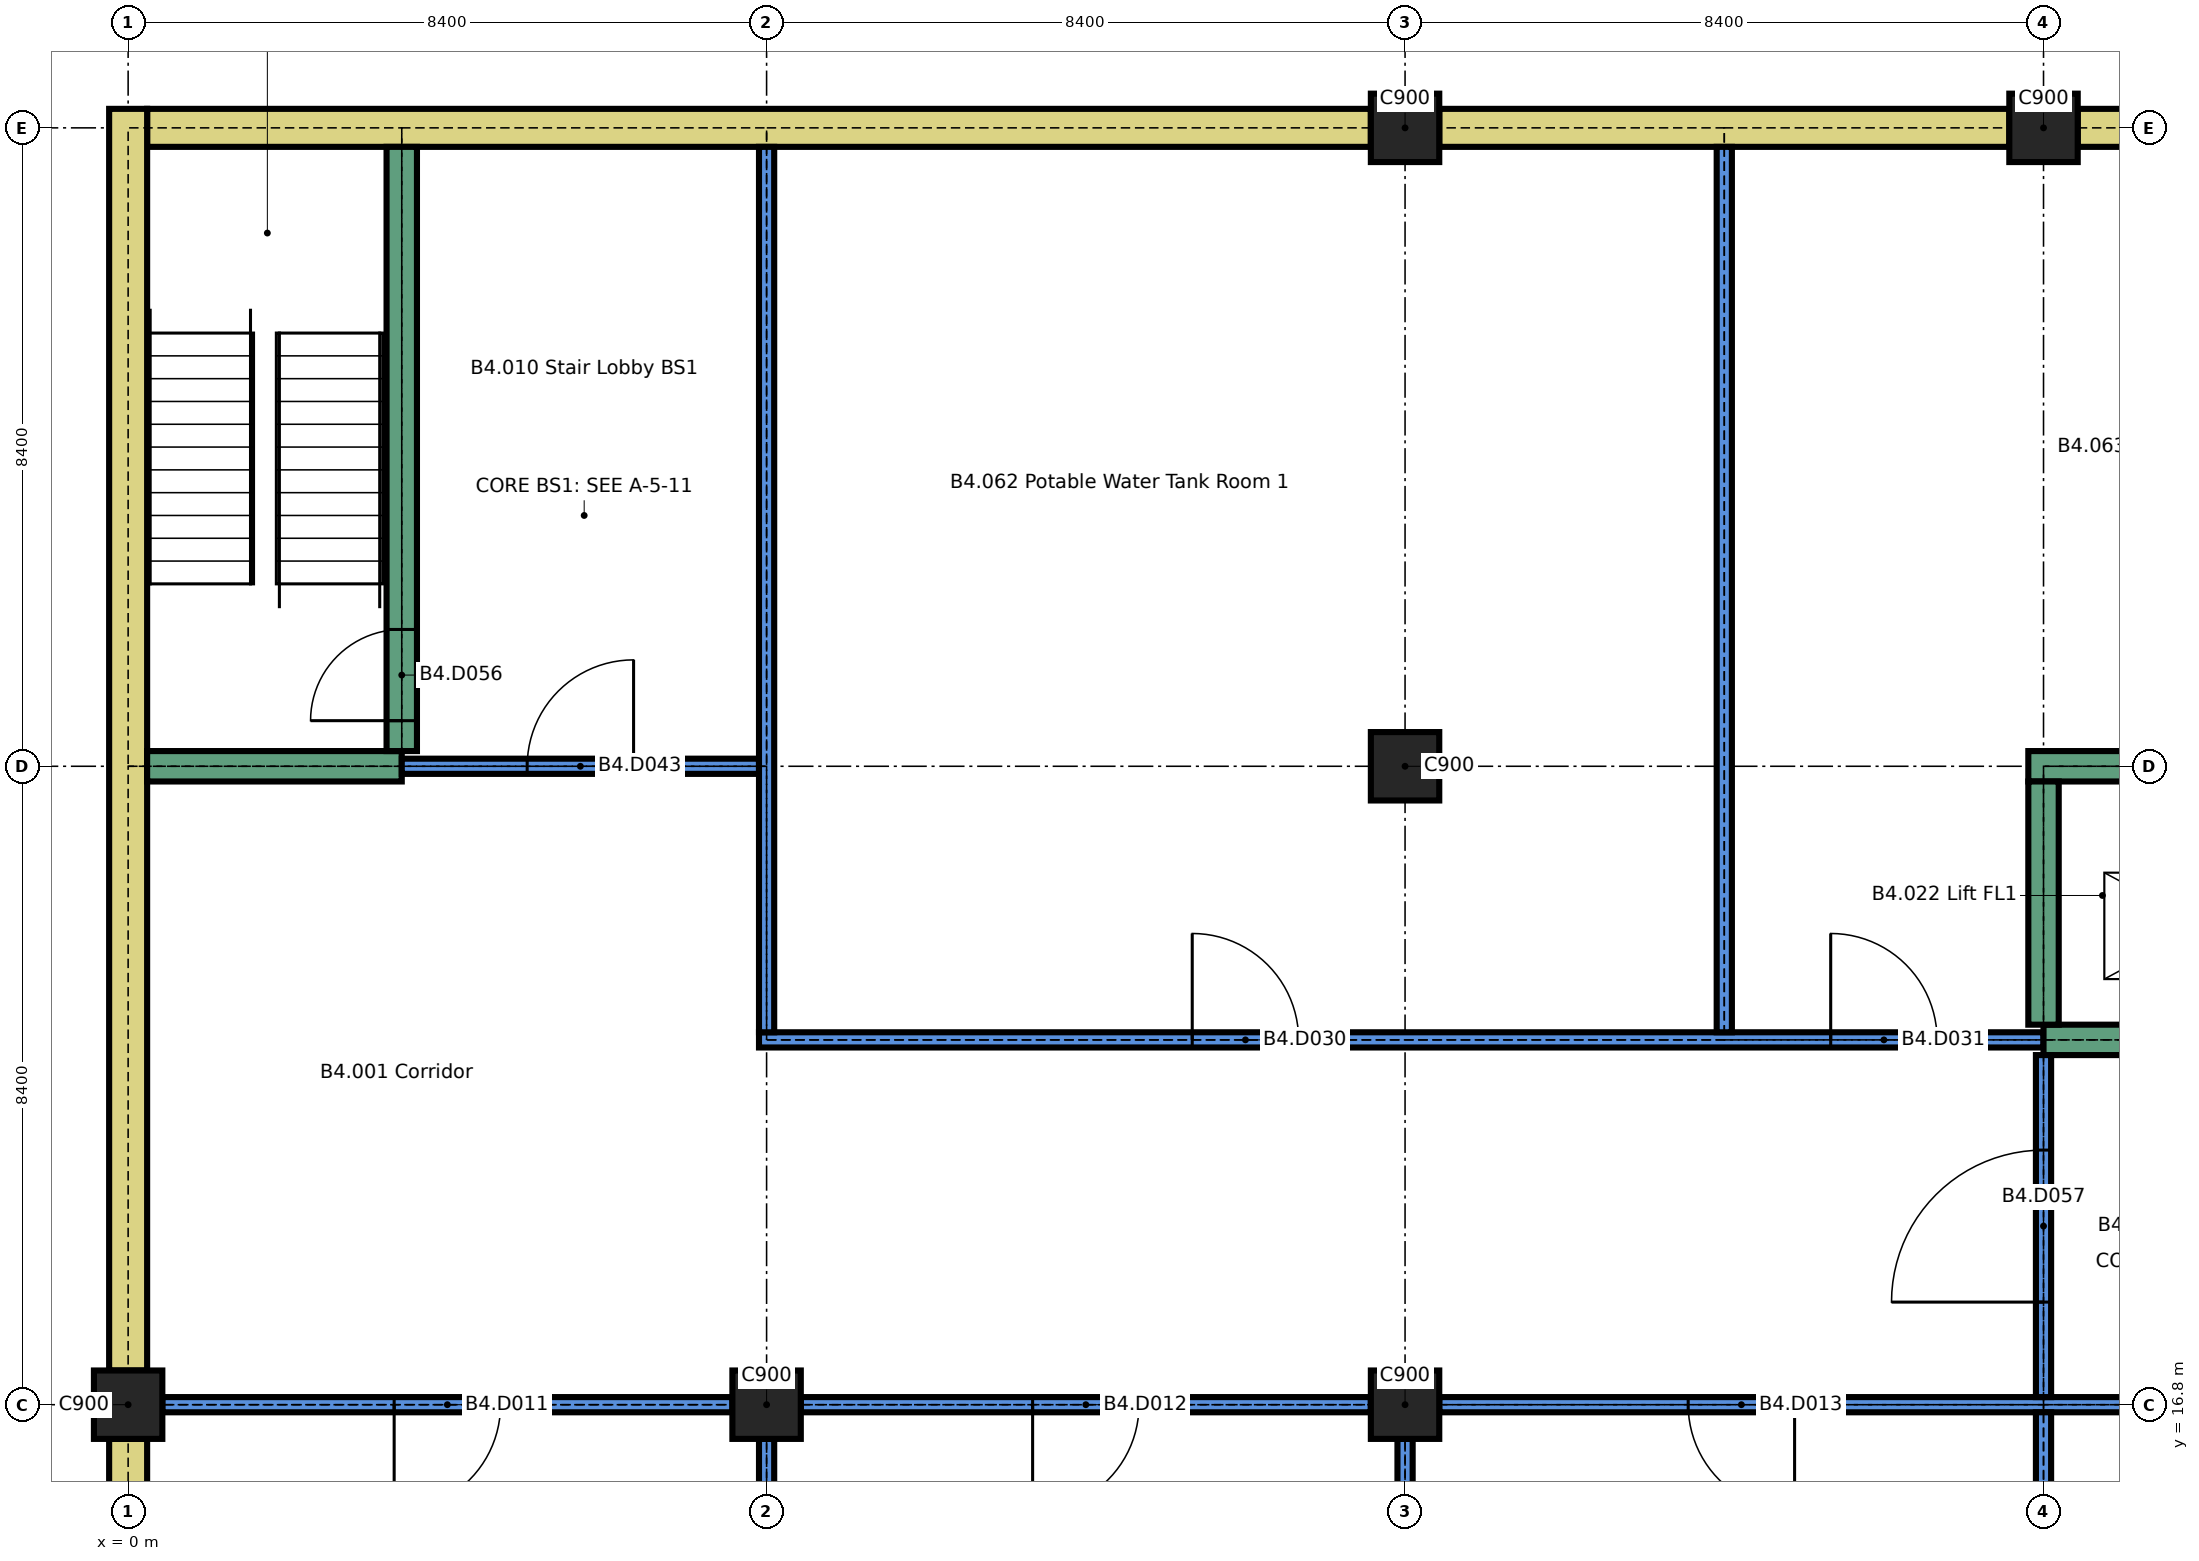
"""IFC4 building model, lengths in metres.
Left out: names, types, materials, properties, quantities, classifications, styles, units other than length and angle.
Written with IfcOpenShell. Run it as: python <this file> out.ifc"""

import sys

from ifc_helpers import new_model, si_unit, direction, frame, frame_2d, origin, origin_2d, place, context, subcontext, project, spatial, rectangle, extrude, element, fill, save


model = new_model("IFC4")
c1 = context("Model", 3, precision=1e-05, world=origin(), true_north=direction((0.0, 1.0)))
c2 = subcontext(c1, "Body", "Model", "MODEL_VIEW")
j1 = project(units=[si_unit("LENGTHUNIT", "METRE"), si_unit("PLANEANGLEUNIT", "RADIAN")], contexts=[c1])
p1 = place(None, origin())
s1 = spatial("IfcSite", under=j1, at=p1, CompositionType="ELEMENT")
p2 = place(p1, origin())
s2 = spatial("IfcBuilding", under=s1, at=p2, CompositionType="ELEMENT")
p3 = place(p2, frame((0.0, 0.0, -15.0)))
s3 = spatial("IfcBuildingStorey", under=s2, at=p3, CompositionType="ELEMENT", Elevation=-15.0)
for number, where, z_axis, x_axis in (
    (1, (0.0, 16.8, 0.0), (0.0, 0.0, 1.0), (1.0, 0.0, 0.0)),
    (2, (8.4, 16.8, 0.0), (0.0, 0.0, 1.0), (1.0, 0.0, 0.0)),
    (3, (16.8, 16.8, 0.0), (0.0, 0.0, 1.0), (1.0, 0.0, 0.0)),
    (4, (16.8, 25.2, 0.0), (0.0, 0.0, 1.0), (1.0, 0.0, 0.0)),
    (5, (16.8, 33.6, 0.0), (0.0, 0.0, 1.0), (1.0, 0.0, 0.0)),
    (6, (25.2, 33.6, 0.0), (0.0, 0.0, 1.0), (1.0, 0.0, 0.0)),
):
    element("IfcColumn", number, at=place(p3, frame(where, z_axis=z_axis, x_axis=x_axis)), inside=s3, PredefinedType="COLUMN", context=c2, shape_type="SweptSolid", body=[
        extrude(rectangle(XDim=0.9, YDim=0.9, at=origin_2d()), origin(), (0.0, 0.0, 1.0), 3.2),
    ])
p4 = place(p3, frame((0.25, 33.6, 0.0), z_axis=(0.0, 0.0, 1.0), x_axis=(1.0, 0.0, 0.0)))
e7 = element("IfcWall", 7, at=p4, inside=s3, PredefinedType="SOLIDWALL", context=c2, shape_type="SweptSolid", body=[
    extrude(rectangle(XDim=16.1, YDim=0.5, at=frame_2d((8.05, 0.0))), origin(), (0.0, 0.0, 1.0), 3.2),
])
for number, where, z_axis, x_axis in (
    (8, (17.25, 33.6, 0.0), (0.0, 0.0, 1.0), (1.0, 0.0, 0.0)),
    (9, (25.65, 33.6, 0.0), (0.0, 0.0, 1.0), (1.0, 0.0, 0.0)),
    (10, (0.0, 8.85, 0.0), (0.0, 0.0, 1.0), (0.0, 1.0, 0.0)),
):
    element("IfcWall", number, at=place(p3, frame(where, z_axis=z_axis, x_axis=x_axis)), inside=s3, PredefinedType="SOLIDWALL", context=c2, shape_type="SweptSolid", body=[
        extrude(rectangle(XDim=7.5, YDim=0.5, at=frame_2d((3.75, 0.0))), origin(), (0.0, 0.0, 1.0), 3.2),
    ])
p5 = place(p3, frame((0.0, 17.25, 0.0), z_axis=(0.0, 0.0, 1.0), x_axis=(0.0, 1.0, 0.0)))
e11 = element("IfcWall", 11, at=p5, inside=s3, PredefinedType="SOLIDWALL", context=c2, shape_type="SweptSolid", body=[
    extrude(rectangle(XDim=16.6, YDim=0.5, at=frame_2d((8.3, 0.0))), origin(), (0.0, 0.0, 1.0), 3.2),
])
p6 = place(p3, frame((0.45, 16.8, 0.0), z_axis=(0.0, 0.0, 1.0), x_axis=(1.0, 0.0, 0.0)))
e12 = element("IfcWall", 12, at=p6, inside=s3, PredefinedType="PARTITIONING", context=c2, shape_type="SweptSolid", body=[
    extrude(rectangle(XDim=7.5, YDim=0.2, at=frame_2d((3.75, 0.0))), origin(), (0.0, 0.0, 1.0), 3.2),
])
p7 = place(p6, frame((3.05, 0.0, 0.0)))
e13 = element("IfcOpeningElement", 13, at=p7, cuts=e12, PredefinedType="OPENING", context=c2, shape_type="SweptSolid", body=[
    extrude(rectangle(XDim=1.4, YDim=2.1, at=frame_2d((0.7, 1.05))), frame((0.0, 0.11, 0.0), z_axis=(0.0, -1.0, 0.0), x_axis=(1.0, 0.0, 0.0)), (0.0, 0.0, 1.0), 0.22),
])
p8 = place(p3, frame((8.85, 16.8, 0.0), z_axis=(0.0, 0.0, 1.0), x_axis=(1.0, 0.0, 0.0)))
e14 = element("IfcWall", 14, at=p8, inside=s3, PredefinedType="PARTITIONING", context=c2, shape_type="SweptSolid", body=[
    extrude(rectangle(XDim=7.5, YDim=0.2, at=frame_2d((3.75, 0.0))), origin(), (0.0, 0.0, 1.0), 3.2),
])
p9 = place(p8, frame((3.05, 0.0, 0.0)))
e15 = element("IfcOpeningElement", 15, at=p9, cuts=e14, PredefinedType="OPENING", context=c2, shape_type="SweptSolid", body=[
    extrude(rectangle(XDim=1.4, YDim=2.1, at=frame_2d((0.7, 1.05))), frame((0.0, 0.11, 0.0), z_axis=(0.0, -1.0, 0.0), x_axis=(1.0, 0.0, 0.0)), (0.0, 0.0, 1.0), 0.22),
])
p10 = place(p3, frame((17.25, 16.8, 0.0), z_axis=(0.0, 0.0, 1.0), x_axis=(1.0, 0.0, 0.0)))
e16 = element("IfcWall", 16, at=p10, inside=s3, PredefinedType="PARTITIONING", context=c2, shape_type="SweptSolid", body=[
    extrude(rectangle(XDim=15.9, YDim=0.2, at=frame_2d((7.95, 0.0))), origin(), (0.0, 0.0, 1.0), 3.2),
])
p11 = place(p10, frame((3.275, 0.0, 0.0)))
e17 = element("IfcOpeningElement", 17, at=p11, cuts=e16, PredefinedType="OPENING", context=c2, shape_type="SweptSolid", body=[
    extrude(rectangle(XDim=1.4, YDim=2.1, at=frame_2d((0.7, 1.05))), frame((0.0, 0.11, 0.0), z_axis=(0.0, -1.0, 0.0), x_axis=(1.0, 0.0, 0.0)), (0.0, 0.0, 1.0), 0.22),
])
p12 = place(p10, frame((13.325, 0.0, 0.0)))
e18 = element("IfcOpeningElement", 18, at=p12, cuts=e16, PredefinedType="OPENING", context=c2, shape_type="SweptSolid", body=[
    extrude(rectangle(XDim=1.4, YDim=2.1, at=frame_2d((0.7, 1.05))), frame((0.0, 0.11, 0.0), z_axis=(0.0, -1.0, 0.0), x_axis=(1.0, 0.0, 0.0)), (0.0, 0.0, 1.0), 0.22),
])
p13 = place(p3, frame((8.3, 21.6, 0.0), z_axis=(0.0, 0.0, 1.0), x_axis=(1.0, 0.0, 0.0)))
e19 = element("IfcWall", 19, at=p13, inside=s3, PredefinedType="PARTITIONING", context=c2, shape_type="SweptSolid", body=[
    extrude(rectangle(XDim=16.9, YDim=0.2, at=frame_2d((8.45, 0.0))), origin(), (0.0, 0.0, 1.0), 3.2),
])
p14 = place(p13, frame((5.7, 0.0, 0.0)))
e20 = element("IfcOpeningElement", 20, at=p14, cuts=e19, PredefinedType="OPENING", context=c2, shape_type="SweptSolid", body=[
    extrude(rectangle(XDim=1.4, YDim=2.1, at=frame_2d((0.7, 1.05))), frame((0.0, 0.11, 0.0), z_axis=(0.0, -1.0, 0.0), x_axis=(1.0, 0.0, 0.0)), (0.0, 0.0, 1.0), 0.22),
])
p15 = place(p13, frame((14.1, 0.0, 0.0)))
e21 = element("IfcOpeningElement", 21, at=p15, cuts=e19, PredefinedType="OPENING", context=c2, shape_type="SweptSolid", body=[
    extrude(rectangle(XDim=1.4, YDim=2.1, at=frame_2d((0.7, 1.05))), frame((0.0, 0.11, 0.0), z_axis=(0.0, -1.0, 0.0), x_axis=(1.0, 0.0, 0.0)), (0.0, 0.0, 1.0), 0.22),
])
p16 = place(p3, frame((25.2, 21.6, 0.0), z_axis=(0.0, 0.0, 1.0), x_axis=(1.0, 0.0, 0.0)))
e22 = element("IfcWall", 22, at=p16, inside=s3, PredefinedType="SHEAR", context=c2, shape_type="SweptSolid", body=[
    extrude(rectangle(XDim=4.2, YDim=0.4, at=frame_2d((2.1, 0.0))), origin(), (0.0, 0.0, 1.0), 3.2),
])
p17 = place(p16, frame((1.55, 0.0, 0.0)))
e23 = element("IfcOpeningElement", 23, at=p17, cuts=e22, PredefinedType="OPENING", context=c2, shape_type="SweptSolid", body=[
    extrude(rectangle(XDim=1.1, YDim=2.1, at=frame_2d((0.55, 1.05))), frame((0.0, 0.21, 0.0), z_axis=(0.0, -1.0, 0.0), x_axis=(1.0, 0.0, 0.0)), (0.0, 0.0, 1.0), 0.42),
])
p18 = place(p3, frame((0.25, 25.2, 0.0), z_axis=(0.0, 0.0, 1.0), x_axis=(1.0, 0.0, 0.0)))
e24 = element("IfcWall", 24, at=p18, inside=s3, PredefinedType="SHEAR", context=c2, shape_type="SweptSolid", body=[
    extrude(rectangle(XDim=3.35, YDim=0.4, at=frame_2d((1.675, 0.0))), origin(), (0.0, 0.0, 1.0), 3.2),
])
p19 = place(p3, frame((3.6, 25.2, 0.0), z_axis=(0.0, 0.0, 1.0), x_axis=(1.0, 0.0, 0.0)))
e25 = element("IfcWall", 25, at=p19, inside=s3, PredefinedType="PARTITIONING", context=c2, shape_type="SweptSolid", body=[
    extrude(rectangle(XDim=4.7, YDim=0.2, at=frame_2d((2.35, 0.0))), origin(), (0.0, 0.0, 1.0), 3.2),
])
p20 = place(p19, frame((1.65, 0.0, 0.0)))
e26 = element("IfcOpeningElement", 26, at=p20, cuts=e25, PredefinedType="OPENING", context=c2, shape_type="SweptSolid", body=[
    extrude(rectangle(XDim=1.4, YDim=2.1, at=frame_2d((0.7, 1.05))), frame((0.0, 0.11, 0.0), z_axis=(0.0, -1.0, 0.0), x_axis=(1.0, 0.0, 0.0)), (0.0, 0.0, 1.0), 0.22),
])
p21 = place(p3, frame((25.0, 25.2, 0.0), z_axis=(0.0, 0.0, 1.0), x_axis=(1.0, 0.0, 0.0)))
e27 = element("IfcWall", 27, at=p21, inside=s3, PredefinedType="SHEAR", context=c2, shape_type="SweptSolid", body=[
    extrude(rectangle(XDim=4.6, YDim=0.4, at=frame_2d((2.3, 0.0))), origin(), (0.0, 0.0, 1.0), 3.2),
])
p22 = place(p3, frame((3.6, 25.4, 0.0), z_axis=(0.0, 0.0, 1.0), x_axis=(0.0, 1.0, 0.0)))
e28 = element("IfcWall", 28, at=p22, inside=s3, PredefinedType="SHEAR", context=c2, shape_type="SweptSolid", body=[
    extrude(rectangle(XDim=7.95, YDim=0.4, at=frame_2d((3.975, 0.0))), origin(), (0.0, 0.0, 1.0), 3.2),
])
p23 = place(p22, frame((0.4, 0.0, 0.0)))
e29 = element("IfcOpeningElement", 29, at=p23, cuts=e28, PredefinedType="OPENING", context=c2, shape_type="SweptSolid", body=[
    extrude(rectangle(XDim=1.2, YDim=2.1, at=frame_2d((0.6, 1.05))), frame((0.0, 0.21, 0.0), z_axis=(0.0, -1.0, 0.0), x_axis=(1.0, 0.0, 0.0)), (0.0, 0.0, 1.0), 0.42),
])
p24 = place(p3, frame((8.4, 8.85, 0.0), z_axis=(0.0, 0.0, 1.0), x_axis=(0.0, 1.0, 0.0)))
e30 = element("IfcWall", 30, at=p24, inside=s3, PredefinedType="PARTITIONING", context=c2, shape_type="SweptSolid", body=[
    extrude(rectangle(XDim=7.5, YDim=0.2, at=frame_2d((3.75, 0.0))), origin(), (0.0, 0.0, 1.0), 3.2),
])
p25 = place(p3, frame((8.4, 21.7, 0.0), z_axis=(0.0, 0.0, 1.0), x_axis=(0.0, 1.0, 0.0)))
e31 = element("IfcWall", 31, at=p25, inside=s3, PredefinedType="PARTITIONING", context=c2, shape_type="SweptSolid", body=[
    extrude(rectangle(XDim=11.65, YDim=0.2, at=frame_2d((5.825, 0.0))), origin(), (0.0, 0.0, 1.0), 3.2),
])
p26 = place(p3, frame((16.8, 8.85, 0.0), z_axis=(0.0, 0.0, 1.0), x_axis=(0.0, 1.0, 0.0)))
e32 = element("IfcWall", 32, at=p26, inside=s3, PredefinedType="PARTITIONING", context=c2, shape_type="SweptSolid", body=[
    extrude(rectangle(XDim=7.5, YDim=0.2, at=frame_2d((3.75, 0.0))), origin(), (0.0, 0.0, 1.0), 3.2),
])
p27 = place(p3, frame((21.0, 21.7, 0.0), z_axis=(0.0, 0.0, 1.0), x_axis=(0.0, 1.0, 0.0)))
e33 = element("IfcWall", 33, at=p27, inside=s3, PredefinedType="PARTITIONING", context=c2, shape_type="SweptSolid", body=[
    extrude(rectangle(XDim=11.65, YDim=0.2, at=frame_2d((5.825, 0.0))), origin(), (0.0, 0.0, 1.0), 3.2),
])
p28 = place(p3, frame((25.2, 8.85, 0.0), z_axis=(0.0, 0.0, 1.0), x_axis=(0.0, 1.0, 0.0)))
e34 = element("IfcWall", 34, at=p28, inside=s3, PredefinedType="PARTITIONING", context=c2, shape_type="SweptSolid", body=[
    extrude(rectangle(XDim=7.85, YDim=0.2, at=frame_2d((3.925, 0.0))), origin(), (0.0, 0.0, 1.0), 3.2),
])
p29 = place(p3, frame((25.2, 16.9, 0.0), z_axis=(0.0, 0.0, 1.0), x_axis=(0.0, 1.0, 0.0)))
e35 = element("IfcWall", 35, at=p29, inside=s3, PredefinedType="PARTITIONING", context=c2, shape_type="SweptSolid", body=[
    extrude(rectangle(XDim=4.5, YDim=0.2, at=frame_2d((2.25, 0.0))), origin(), (0.0, 0.0, 1.0), 3.2),
])
p30 = place(p29, frame((1.25, 0.0, 0.0)))
e36 = element("IfcOpeningElement", 36, at=p30, cuts=e35, PredefinedType="OPENING", context=c2, shape_type="SweptSolid", body=[
    extrude(rectangle(XDim=2.0, YDim=2.4, at=frame_2d((1.0, 1.2))), frame((0.0, 0.11, 0.0), z_axis=(0.0, -1.0, 0.0), x_axis=(1.0, 0.0, 0.0)), (0.0, 0.0, 1.0), 0.22),
])
p31 = place(p3, frame((25.2, 21.8, 0.0), z_axis=(0.0, 0.0, 1.0), x_axis=(0.0, 1.0, 0.0)))
e37 = element("IfcWall", 37, at=p31, inside=s3, PredefinedType="SHEAR", context=c2, shape_type="SweptSolid", body=[
    extrude(rectangle(XDim=3.2, YDim=0.4, at=frame_2d((1.6, 0.0))), origin(), (0.0, 0.0, 1.0), 3.2),
])
p32 = place(p7, origin())
e38 = element("IfcDoor", 38, at=p32, inside=s3, OperationType="SINGLE_SWING_LEFT", PredefinedType="DOOR", context=c2, shape_type="SweptSolid", body=[
    extrude(rectangle(XDim=1.4, YDim=2.1, at=frame_2d((0.7, 1.05))), frame((0.0, 0.025, 0.0), z_axis=(0.0, -1.0, 0.0), x_axis=(1.0, 0.0, 0.0)), (0.0, 0.0, 1.0), 0.05),
])
fill(e13, e38)
p33 = place(p9, origin())
e39 = element("IfcDoor", 39, at=p33, inside=s3, OperationType="SINGLE_SWING_LEFT", PredefinedType="DOOR", context=c2, shape_type="SweptSolid", body=[
    extrude(rectangle(XDim=1.4, YDim=2.1, at=frame_2d((0.7, 1.05))), frame((0.0, 0.025, 0.0), z_axis=(0.0, -1.0, 0.0), x_axis=(1.0, 0.0, 0.0)), (0.0, 0.0, 1.0), 0.05),
])
fill(e15, e39)
p34 = place(p11, origin())
e40 = element("IfcDoor", 40, at=p34, inside=s3, OperationType="SINGLE_SWING_RIGHT", PredefinedType="DOOR", context=c2, shape_type="SweptSolid", body=[
    extrude(rectangle(XDim=1.4, YDim=2.1, at=frame_2d((0.7, 1.05))), frame((0.0, 0.025, 0.0), z_axis=(0.0, -1.0, 0.0), x_axis=(1.0, 0.0, 0.0)), (0.0, 0.0, 1.0), 0.05),
])
fill(e17, e40)
p35 = place(p14, origin())
e41 = element("IfcDoor", 41, at=p35, inside=s3, OperationType="SINGLE_SWING_RIGHT", PredefinedType="DOOR", context=c2, shape_type="SweptSolid", body=[
    extrude(rectangle(XDim=1.4, YDim=2.1, at=frame_2d((0.7, 1.05))), frame((0.0, 0.025, 0.0), z_axis=(0.0, -1.0, 0.0), x_axis=(1.0, 0.0, 0.0)), (0.0, 0.0, 1.0), 0.05),
])
fill(e20, e41)
p36 = place(p15, origin())
e42 = element("IfcDoor", 42, at=p36, inside=s3, OperationType="SINGLE_SWING_RIGHT", PredefinedType="DOOR", context=c2, shape_type="SweptSolid", body=[
    extrude(rectangle(XDim=1.4, YDim=2.1, at=frame_2d((0.7, 1.05))), frame((0.0, 0.025, 0.0), z_axis=(0.0, -1.0, 0.0), x_axis=(1.0, 0.0, 0.0)), (0.0, 0.0, 1.0), 0.05),
])
fill(e21, e42)
p37 = place(p20, origin())
e43 = element("IfcDoor", 43, at=p37, inside=s3, OperationType="SINGLE_SWING_LEFT", PredefinedType="DOOR", context=c2, shape_type="SweptSolid", body=[
    extrude(rectangle(XDim=1.4, YDim=2.1, at=frame_2d((0.7, 1.05))), frame((0.0, 0.03, 0.0), z_axis=(0.0, -1.0, 0.0), x_axis=(1.0, 0.0, 0.0)), (0.0, 0.0, 1.0), 0.06),
])
fill(e26, e43)
p38 = place(p23, origin())
e44 = element("IfcDoor", 44, at=p38, inside=s3, OperationType="SINGLE_SWING_RIGHT", PredefinedType="DOOR", context=c2, shape_type="SweptSolid", body=[
    extrude(rectangle(XDim=1.2, YDim=2.1, at=frame_2d((0.6, 1.05))), frame((0.0, 0.025, 0.0), z_axis=(0.0, -1.0, 0.0), x_axis=(1.0, 0.0, 0.0)), (0.0, 0.0, 1.0), 0.05),
])
fill(e29, e44)
p39 = place(p30, origin())
e45 = element("IfcDoor", 45, at=p39, inside=s3, OperationType="SINGLE_SWING_RIGHT", PredefinedType="DOOR", context=c2, shape_type="SweptSolid", body=[
    extrude(rectangle(XDim=2.0, YDim=2.4, at=frame_2d((1.0, 1.2))), frame((0.0, 0.03, 0.0), z_axis=(0.0, -1.0, 0.0), x_axis=(1.0, 0.0, 0.0)), (0.0, 0.0, 1.0), 0.06),
])
fill(e36, e45)
save(model, sys.argv[1])
